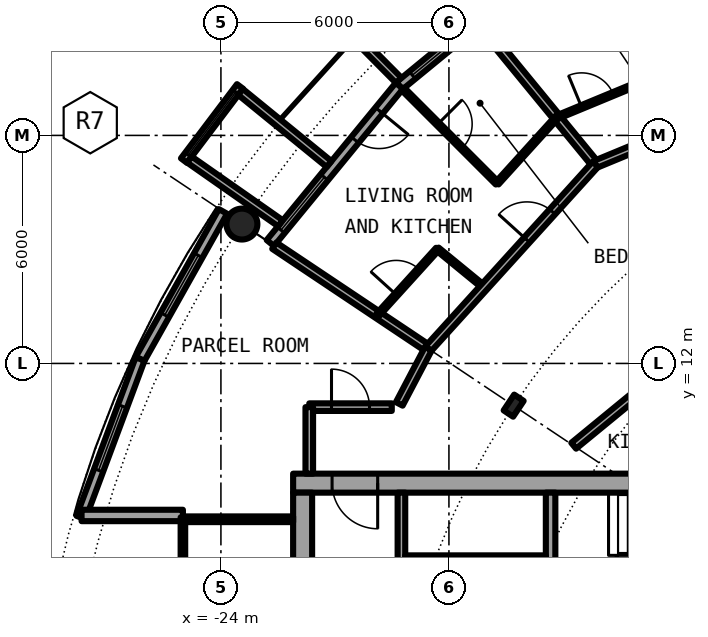
"""IFC4 building model, lengths in metres.
Left out: names, types, materials, properties, quantities, classifications, styles, units other than length and angle.
Written with IfcOpenShell. Run it as: python <this file> out.ifc"""

import sys

from ifc_helpers import new_model, si_unit, direction, frame, frame_2d, origin, origin_2d, place, context, subcontext, project, spatial, rectangle, circle, hollow_circle, i_section, extrude, element, fill, save


model = new_model("IFC4")
c1 = context("Model", 3, precision=1e-05, world=origin(), true_north=direction((0.0, 1.0)))
c2 = subcontext(c1, "Body", "Model", "MODEL_VIEW")
j1 = project(units=[si_unit("LENGTHUNIT", "METRE"), si_unit("PLANEANGLEUNIT", "RADIAN")], contexts=[c1])
p1 = place(None, origin())
s1 = spatial("IfcSite", under=j1, at=p1, CompositionType="ELEMENT")
p2 = place(p1, origin())
s2 = spatial("IfcBuilding", under=s1, at=p2, CompositionType="ELEMENT")
p3 = place(p2, frame((0.0, 0.0, 173.8)))
s3 = spatial("IfcBuildingStorey", under=s2, at=p3, CompositionType="ELEMENT", Elevation=173.8)
p4 = place(p3, frame((-23.448, 15.667, 0.0), z_axis=(0.0, 0.0, 1.0), x_axis=(1.0, 0.0, 0.0)))
e1 = element("IfcColumn", 1, at=p4, inside=s3, PredefinedType="COLUMN", context=c2, shape_type="SweptSolid", body=[
    extrude(hollow_circle(Radius=0.406, WallThickness=0.04, at=origin_2d()), origin(), (0.0, 0.0, 1.0), 3.05),
])
p5 = place(p3, frame((-16.297, 10.889, 0.0), z_axis=(0.0, 0.0, 1.0), x_axis=(-0.831469612303, 0.55557023302, 0.0)))
e2 = element("IfcColumn", 2, at=p5, inside=s3, PredefinedType="COLUMN", context=c2, shape_type="SweptSolid", body=[
    extrude(i_section(OverallWidth=0.3, OverallDepth=0.5, WebThickness=0.014, FlangeThickness=0.028, FilletRadius=0.027, at=origin_2d()), origin(), (0.0, 0.0, 1.0), 3.05),
])
p6 = place(p3, frame((-15.167, 22.699, 0.0), z_axis=(0.0, 0.0, 1.0), x_axis=(-0.773019449054, -0.634382322723, 0.0)))
e3 = element("IfcWall", 3, at=p6, inside=s3, PredefinedType="SOLIDWALL", context=c2, shape_type="SweptSolid", body=[
    extrude(rectangle(XDim=5.352, YDim=0.25, at=frame_2d((2.676, 0.0))), origin(), (0.0, 0.0, 1.0), 2.7),
])
p7 = place(p6, frame((0.841, 0.0, 0.0)))
e4 = element("IfcOpeningElement", 4, at=p7, cuts=e3, PredefinedType="OPENING", context=c2, shape_type="SweptSolid", body=[
    extrude(rectangle(XDim=1.0, YDim=2.2, at=frame_2d((0.5, 1.1))), frame((0.0, 0.135, 0.0), z_axis=(0.0, -1.0, 0.0), x_axis=(1.0, 0.0, 0.0)), (0.0, 0.0, 1.0), 0.27),
])
p8 = place(p6, frame((3.111, 0.0, 0.3)))
e5 = element("IfcOpeningElement", 5, at=p8, cuts=e3, PredefinedType="OPENING", context=c2, shape_type="SweptSolid", body=[
    extrude(rectangle(XDim=1.8, YDim=2.1, at=frame_2d((0.9, 1.05))), frame((0.0, 0.135, 0.0), z_axis=(0.0, -1.0, 0.0), x_axis=(1.0, 0.0, 0.0)), (0.0, 0.0, 1.0), 0.27),
])
p9 = place(p3, frame((-19.323, 19.45, -0.03), z_axis=(0.0, 0.0, 1.0), x_axis=(-0.704476739375, 0.709727076896, 0.0)))
e6 = element("IfcWall", 6, at=p9, inside=s3, PredefinedType="SOLIDWALL", context=c2, shape_type="SweptSolid", body=[
    extrude(rectangle(XDim=2.883, YDim=0.2, at=frame_2d((1.441, 0.0))), origin(), (0.0, 0.0, 1.0), 2.73),
])
p10 = place(p3, frame((-19.304, 19.304, 0.0), z_axis=(0.0, 0.0, 1.0), x_axis=(-0.634382322723, -0.773019449054, 0.0)))
e7 = element("IfcWall", 7, at=p10, inside=s3, PredefinedType="SOLIDWALL", context=c2, shape_type="SweptSolid", body=[
    extrude(rectangle(XDim=5.352, YDim=0.25, at=frame_2d((2.676, 0.0))), origin(), (0.0, 0.0, 1.0), 2.7),
])
p11 = place(p10, frame((0.841, 0.0, 0.0)))
e8 = element("IfcOpeningElement", 8, at=p11, cuts=e7, PredefinedType="OPENING", context=c2, shape_type="SweptSolid", body=[
    extrude(rectangle(XDim=1.0, YDim=2.2, at=frame_2d((0.5, 1.1))), frame((0.0, 0.135, 0.0), z_axis=(0.0, -1.0, 0.0), x_axis=(1.0, 0.0, 0.0)), (0.0, 0.0, 1.0), 0.27),
])
p12 = place(p10, frame((3.111, 0.0, 0.3)))
e9 = element("IfcOpeningElement", 9, at=p12, cuts=e7, PredefinedType="OPENING", context=c2, shape_type="SweptSolid", body=[
    extrude(rectangle(XDim=1.8, YDim=2.1, at=frame_2d((0.9, 1.05))), frame((0.0, 0.135, 0.0), z_axis=(0.0, -1.0, 0.0), x_axis=(1.0, 0.0, 0.0)), (0.0, 0.0, 1.0), 0.27),
])
p13 = place(p3, frame((-23.497, 19.289, -0.03), z_axis=(0.0, 0.0, 1.0), x_axis=(-0.602806268067, -0.797887588059, 0.0)))
e10 = element("IfcWall", 10, at=p13, inside=s3, PredefinedType="SOLIDWALL", context=c2, shape_type="SweptSolid", body=[
    extrude(rectangle(XDim=2.447, YDim=0.2, at=frame_2d((1.223, 0.0))), origin(), (0.0, 0.0, 1.0), 2.73),
])
p14 = place(p13, frame((0.183, 0.0, 0.33)))
e11 = element("IfcOpeningElement", 11, at=p14, cuts=e10, PredefinedType="OPENING", context=c2, shape_type="SweptSolid", body=[
    extrude(circle(Radius=1.04, at=frame_2d((1.04, 1.04))), frame((0.0, 0.11, 0.0), z_axis=(0.0, -1.0, 0.0), x_axis=(1.0, 0.0, 0.0)), (0.0, 0.0, 1.0), 0.22),
])
p15 = place(p3, frame((-21.155, 17.246, -0.03), z_axis=(0.0, 0.0, 1.0), x_axis=(-0.775179004516, 0.631741648902, 0.0)))
e12 = element("IfcWall", 12, at=p15, inside=s3, PredefinedType="SOLIDWALL", context=c2, shape_type="SweptSolid", body=[
    extrude(rectangle(XDim=3.006, YDim=0.2, at=frame_2d((1.503, 0.0))), origin(), (0.0, 0.0, 1.0), 2.73),
])
p16 = place(p3, frame((-22.433, 15.688, -0.03), z_axis=(0.0, 0.0, 1.0), x_axis=(-0.819373043115, 0.573260687834, 0.0)))
e13 = element("IfcWall", 13, at=p16, inside=s3, PredefinedType="SOLIDWALL", context=c2, shape_type="SweptSolid", body=[
    extrude(rectangle(XDim=2.925, YDim=0.2, at=frame_2d((1.463, 0.0))), origin(), (0.0, 0.0, 1.0), 2.73),
])
p17 = place(p3, frame((-23.946, 16.0, 0.0), z_axis=(0.0, 0.0, 1.0), x_axis=(-0.489696356642, -0.871893042919, 0.0)))
e14 = element("IfcWall", 14, at=p17, inside=s3, PredefinedType="SOLIDWALL", context=c2, shape_type="SweptSolid", body=[
    extrude(rectangle(XDim=4.454, YDim=0.25, at=frame_2d((2.227, 0.0))), origin(), (0.0, 0.0, 1.0), 2.7),
])
p18 = place(p17, frame((1.327, 0.0, 0.3)))
e15 = element("IfcOpeningElement", 15, at=p18, cuts=e14, PredefinedType="OPENING", context=c2, shape_type="SweptSolid", body=[
    extrude(rectangle(XDim=1.8, YDim=2.1, at=frame_2d((0.9, 1.05))), frame((0.0, 0.135, 0.0), z_axis=(0.0, -1.0, 0.0), x_axis=(1.0, 0.0, 0.0)), (0.0, 0.0, 1.0), 0.27),
])
p19 = place(p3, frame((-26.127, 12.117, 0.0), z_axis=(0.0, 0.0, 1.0), x_axis=(-0.349247811493, -0.937030397675, 0.0)))
e16 = element("IfcWall", 16, at=p19, inside=s3, PredefinedType="SOLIDWALL", context=c2, shape_type="SweptSolid", body=[
    extrude(rectangle(XDim=4.452, YDim=0.25, at=frame_2d((2.226, 0.0))), origin(), (0.0, 0.0, 1.0), 2.7),
])
p20 = place(p19, frame((1.327, 0.0, 0.3)))
e17 = element("IfcOpeningElement", 17, at=p20, cuts=e16, PredefinedType="OPENING", context=c2, shape_type="SweptSolid", body=[
    extrude(rectangle(XDim=1.8, YDim=2.1, at=frame_2d((0.9, 1.05))), frame((0.0, 0.135, 0.0), z_axis=(0.0, -1.0, 0.0), x_axis=(1.0, 0.0, 0.0)), (0.0, 0.0, 1.0), 0.27),
])
p21 = place(p3, frame((-25.0, 8.0, 0.0), z_axis=(0.0, 0.0, 1.0), x_axis=(-1.0, 0.0, 0.0)))
e18 = element("IfcWall", 18, at=p21, inside=s3, PredefinedType="SOLIDWALL", context=c2, shape_type="SweptSolid", body=[
    extrude(rectangle(XDim=2.667, YDim=0.3, at=frame_2d((1.333, 0.0))), origin(), (0.0, 0.0, 1.0), 2.7),
])
p22 = place(p3, frame((-8.5, 8.85, 0.0), z_axis=(0.0, 0.0, 1.0), x_axis=(-1.0, 0.0, 0.0)))
e19 = element("IfcWall", 19, at=p22, inside=s3, PredefinedType="SHEAR", context=c2, shape_type="SweptSolid", body=[
    extrude(rectangle(XDim=13.6, YDim=0.5, at=frame_2d((6.8, 0.0))), origin(), (0.0, 0.0, 1.0), 3.05),
])
p23 = place(p22, frame((11.375, 0.0, 0.0)))
e20 = element("IfcOpeningElement", 20, at=p23, cuts=e19, PredefinedType="OPENING", context=c2, shape_type="SweptSolid", body=[
    extrude(rectangle(XDim=1.2, YDim=2.3, at=frame_2d((0.6, 1.15))), frame((0.0, 0.26, 0.0), z_axis=(0.0, -1.0, 0.0), x_axis=(1.0, 0.0, 0.0)), (0.0, 0.0, 1.0), 0.52),
])
p24 = place(p3, frame((-21.85, -8.6, 0.0), z_axis=(0.0, 0.0, 1.0), x_axis=(0.0, 1.0, 0.0)))
e21 = element("IfcWall", 21, at=p24, inside=s3, PredefinedType="SHEAR", context=c2, shape_type="SweptSolid", body=[
    extrude(rectangle(XDim=17.2, YDim=0.5, at=frame_2d((8.6, 0.0))), origin(), (0.0, 0.0, 1.0), 3.05),
])
p25 = place(p24, frame((7.7, 0.0, 0.0)))
e22 = element("IfcOpeningElement", 22, at=p25, cuts=e21, PredefinedType="OPENING", context=c2, shape_type="SweptSolid", body=[
    extrude(rectangle(XDim=1.8, YDim=2.3, at=frame_2d((0.9, 1.15))), frame((0.0, 0.26, 0.0), z_axis=(0.0, -1.0, 0.0), x_axis=(1.0, 0.0, 0.0)), (0.0, 0.0, 1.0), 0.52),
])
p26 = place(p3, frame((-15.325, 8.6, 0.0), z_axis=(0.0, 0.0, 1.0), x_axis=(0.0, -1.0, 0.0)))
e23 = element("IfcWall", 23, at=p26, inside=s3, PredefinedType="SHEAR", context=c2, shape_type="SweptSolid", body=[
    extrude(rectangle(XDim=3.95, YDim=0.25, at=frame_2d((1.975, 0.0))), origin(), (0.0, 0.0, 1.0), 3.05),
])
p27 = place(p26, frame((2.025, 0.0, 0.0)))
e24 = element("IfcOpeningElement", 24, at=p27, cuts=e23, PredefinedType="OPENING", context=c2, shape_type="SweptSolid", body=[
    extrude(rectangle(XDim=1.2, YDim=2.3, at=frame_2d((0.6, 1.15))), frame((0.0, 0.135, 0.0), z_axis=(0.0, -1.0, 0.0), x_axis=(1.0, 0.0, 0.0)), (0.0, 0.0, 1.0), 0.27),
])
p28 = place(p3, frame((-19.25, 8.6, 0.0), z_axis=(0.0, 0.0, 1.0), x_axis=(0.0, -1.0, 0.0)))
e25 = element("IfcWall", 25, at=p28, inside=s3, PredefinedType="SOLIDWALL", context=c2, shape_type="SweptSolid", body=[
    extrude(rectangle(XDim=7.025, YDim=0.2, at=frame_2d((3.513, 0.0))), origin(), (0.0, 0.0, 1.0), 2.7),
])
p29 = place(p28, frame((2.35, 0.0, 0.0)))
e26 = element("IfcOpeningElement", 26, at=p29, cuts=e25, PredefinedType="OPENING", context=c2, shape_type="SweptSolid", body=[
    extrude(rectangle(XDim=1.1, YDim=2.3, at=frame_2d((0.55, 1.15))), frame((0.0, 0.11, 0.0), z_axis=(0.0, -1.0, 0.0), x_axis=(1.0, 0.0, 0.0)), (0.0, 0.0, 1.0), 0.22),
])
p30 = place(p3, frame((-15.45, 6.875, 0.0), z_axis=(0.0, 0.0, 1.0), x_axis=(-1.0, 0.0, 0.0)))
e27 = element("IfcWall", 27, at=p30, inside=s3, PredefinedType="PARTITIONING", context=c2, shape_type="SweptSolid", body=[
    extrude(rectangle(XDim=3.7, YDim=0.15, at=frame_2d((1.85, 0.0))), origin(), (0.0, 0.0, 1.0), 2.7),
])
p31 = place(p30, frame((1.4, 0.0, 0.0)))
e28 = element("IfcOpeningElement", 28, at=p31, cuts=e27, PredefinedType="OPENING", context=c2, shape_type="SweptSolid", body=[
    extrude(rectangle(XDim=0.9, YDim=2.3, at=frame_2d((0.45, 1.15))), frame((0.0, 0.085, 0.0), z_axis=(0.0, -1.0, 0.0), x_axis=(1.0, 0.0, 0.0)), (0.0, 0.0, 1.0), 0.17),
])
p32 = place(p3, frame((-22.1, 7.9, 0.0), z_axis=(0.0, 0.0, 1.0), x_axis=(-1.0, 0.0, 0.0)))
e29 = element("IfcWall", 29, at=p32, inside=s3, PredefinedType="PARTITIONING", context=c2, shape_type="SweptSolid", body=[
    extrude(rectangle(XDim=2.84, YDim=0.15, at=frame_2d((1.42, 0.0))), origin(), (0.0, 0.0, 1.0), 2.7),
])
p33 = place(p3, frame((-25.0, 7.95, 0.0), z_axis=(0.0, 0.0, 1.0), x_axis=(0.0, -1.0, 0.0)))
e30 = element("IfcWall", 30, at=p33, inside=s3, PredefinedType="PARTITIONING", context=c2, shape_type="SweptSolid", body=[
    extrude(rectangle(XDim=15.9, YDim=0.12, at=frame_2d((7.95, 0.0))), origin(), (0.0, 0.0, 1.0), 2.7),
])
p34 = place(p33, frame((0.95, 0.0, 0.1)))
e31 = element("IfcOpeningElement", 31, at=p34, cuts=e30, PredefinedType="OPENING", context=c2, shape_type="SweptSolid", body=[
    extrude(rectangle(XDim=14.0, YDim=2.35, at=frame_2d((7.0, 1.175))), frame((0.0, 0.07, 0.0), z_axis=(0.0, -1.0, 0.0), x_axis=(1.0, 0.0, 0.0)), (0.0, 0.0, 1.0), 0.14),
])
p35 = place(p3, frame((-22.595, 15.098, 0.0), z_axis=(0.0, 0.0, 1.0), x_axis=(0.831387096605, -0.55569370664, 0.0)))
e32 = element("IfcWall", 32, at=p35, inside=s3, PredefinedType="PARTITIONING", context=c2, shape_type="SweptSolid", body=[
    extrude(rectangle(XDim=4.875, YDim=0.2, at=frame_2d((2.438, 0.0))), origin(), (0.0, 0.0, 1.0), 2.7),
])
p36 = place(p3, frame((-19.21, 19.222, 0.0), z_axis=(0.0, 0.0, 1.0), x_axis=(0.706967463531, -0.707246071398, 0.0)))
e33 = element("IfcWall", 33, at=p36, inside=s3, PredefinedType="PARTITIONING", context=c2, shape_type="SweptSolid", body=[
    extrude(rectangle(XDim=3.505, YDim=0.1, at=frame_2d((1.752, 0.0))), origin(), (0.0, 0.0, 1.0), 2.7),
])
p37 = place(p36, frame((1.303, 0.0, 0.0)))
e34 = element("IfcOpeningElement", 34, at=p37, cuts=e33, PredefinedType="OPENING", context=c2, shape_type="SweptSolid", body=[
    extrude(rectangle(XDim=0.9, YDim=2.3, at=frame_2d((0.45, 1.15))), frame((0.0, 0.06, 0.0), z_axis=(0.0, -1.0, 0.0), x_axis=(1.0, 0.0, 0.0)), (0.0, 0.0, 1.0), 0.12),
])
p38 = place(p3, frame((-17.24, 21.007, 0.0), z_axis=(0.0, 0.0, 1.0), x_axis=(0.634374159378, -0.773026148273, 0.0)))
e35 = element("IfcWall", 35, at=p38, inside=s3, PredefinedType="PARTITIONING", context=c2, shape_type="SweptSolid", body=[
    extrude(rectangle(XDim=4.876, YDim=0.2, at=frame_2d((2.438, 0.0))), origin(), (0.0, 0.0, 1.0), 2.7),
])
p39 = place(p3, frame((-18.302, 15.01, 0.0), z_axis=(0.0, 0.0, 1.0), x_axis=(0.773476341377, -0.633825172528, 0.0)))
e36 = element("IfcWall", 36, at=p39, inside=s3, PredefinedType="PARTITIONING", context=c2, shape_type="SweptSolid", body=[
    extrude(rectangle(XDim=1.584, YDim=0.1, at=frame_2d((0.792, 0.0))), origin(), (0.0, 0.0, 1.0), 2.7),
])
p40 = place(p3, frame((-21.675, 10.85, 0.0), z_axis=(0.0, 0.0, 1.0), x_axis=(1.0, 0.0, 0.0)))
e37 = element("IfcWall", 37, at=p40, inside=s3, PredefinedType="PARTITIONING", context=c2, shape_type="SweptSolid", body=[
    extrude(rectangle(XDim=2.171, YDim=0.2, at=frame_2d((1.085, 0.0))), origin(), (0.0, 0.0, 1.0), 2.7),
])
p41 = place(p40, frame((0.585, 0.0, 0.0)))
e38 = element("IfcOpeningElement", 38, at=p41, cuts=e37, PredefinedType="OPENING", context=c2, shape_type="SweptSolid", body=[
    extrude(rectangle(XDim=1.0, YDim=2.3, at=frame_2d((0.5, 1.15))), frame((0.0, 0.11, 0.0), z_axis=(0.0, -1.0, 0.0), x_axis=(1.0, 0.0, 0.0)), (0.0, 0.0, 1.0), 0.22),
])
p42 = place(p3, frame((-14.717, 9.834, 0.0), z_axis=(0.0, 0.0, 1.0), x_axis=(0.773034536097, 0.634363938131, 0.0)))
e39 = element("IfcWall", 39, at=p42, inside=s3, PredefinedType="PARTITIONING", context=c2, shape_type="SweptSolid", body=[
    extrude(rectangle(XDim=10.277, YDim=0.2, at=frame_2d((5.138, 0.0))), origin(), (0.0, 0.0, 1.0), 2.7),
])
p43 = place(p42, frame((4.638, 0.0, 0.0)))
e40 = element("IfcOpeningElement", 40, at=p43, cuts=e39, PredefinedType="OPENING", context=c2, shape_type="SweptSolid", body=[
    extrude(rectangle(XDim=1.0, YDim=2.3, at=frame_2d((0.5, 1.15))), frame((0.0, 0.11, 0.0), z_axis=(0.0, -1.0, 0.0), x_axis=(1.0, 0.0, 0.0)), (0.0, 0.0, 1.0), 0.22),
])
p44 = place(p3, frame((-14.147, 17.238, 0.0), z_axis=(0.0, 0.0, 1.0), x_axis=(0.923860535822, 0.382729291212, 0.0)))
e41 = element("IfcWall", 41, at=p44, inside=s3, PredefinedType="PARTITIONING", context=c2, shape_type="SweptSolid", body=[
    extrude(rectangle(XDim=12.947, YDim=0.2, at=frame_2d((6.473, 0.0))), origin(), (0.0, 0.0, 1.0), 2.7),
])
p45 = place(p44, frame((7.053, 0.0, 0.0)))
e42 = element("IfcOpeningElement", 42, at=p45, cuts=e41, PredefinedType="OPENING", context=c2, shape_type="SweptSolid", body=[
    extrude(rectangle(XDim=1.0, YDim=2.3, at=frame_2d((0.5, 1.15))), frame((0.0, 0.11, 0.0), z_axis=(0.0, -1.0, 0.0), x_axis=(1.0, 0.0, 0.0)), (0.0, 0.0, 1.0), 0.22),
])
p46 = place(p3, frame((-21.675, 9.1, 0.0), z_axis=(0.0, 0.0, 1.0), x_axis=(0.0, 1.0, 0.0)))
e43 = element("IfcWall", 43, at=p46, inside=s3, PredefinedType="PARTITIONING", context=c2, shape_type="SweptSolid", body=[
    extrude(rectangle(XDim=1.75, YDim=0.2, at=frame_2d((0.875, 0.0))), origin(), (0.0, 0.0, 1.0), 2.7),
])
p47 = place(p3, frame((-18.542, 12.389, 0.0), z_axis=(0.0, 0.0, 1.0), x_axis=(0.671561669125, 0.740948665268, 0.0)))
e44 = element("IfcWall", 44, at=p47, inside=s3, PredefinedType="PARTITIONING", context=c2, shape_type="SweptSolid", body=[
    extrude(rectangle(XDim=6.544, YDim=0.2, at=frame_2d((3.272, 0.0))), origin(), (0.0, 0.0, 1.0), 2.7),
])
p48 = place(p47, frame((3.862, 0.0, 0.0)))
e45 = element("IfcOpeningElement", 45, at=p48, cuts=e44, PredefinedType="OPENING", context=c2, shape_type="SweptSolid", body=[
    extrude(rectangle(XDim=1.0, YDim=2.3, at=frame_2d((0.5, 1.15))), frame((0.0, 0.11, 0.0), z_axis=(0.0, -1.0, 0.0), x_axis=(1.0, 0.0, 0.0)), (0.0, 0.0, 1.0), 0.22),
])
p49 = place(p3, frame((-19.307, 10.935, 0.0), z_axis=(0.0, 0.0, 1.0), x_axis=(0.465605550524, 0.884992356646, 0.0)))
e46 = element("IfcWall", 46, at=p49, inside=s3, PredefinedType="PARTITIONING", context=c2, shape_type="SweptSolid", body=[
    extrude(rectangle(XDim=1.643, YDim=0.2, at=frame_2d((0.821, 0.0))), origin(), (0.0, 0.0, 1.0), 2.7),
])
p50 = place(p3, frame((-15.162, 18.475, 0.0), z_axis=(0.0, 0.0, 1.0), x_axis=(0.923917795213, 0.382591044968, 0.0)))
e47 = element("IfcWall", 47, at=p50, inside=s3, PredefinedType="PARTITIONING", context=c2, shape_type="SweptSolid", body=[
    extrude(rectangle(XDim=2.313, YDim=0.1, at=frame_2d((1.157, 0.0))), origin(), (0.0, 0.0, 1.0), 2.7),
])
p51 = place(p50, frame((0.707, 0.0, 0.0)))
e48 = element("IfcOpeningElement", 48, at=p51, cuts=e47, PredefinedType="OPENING", context=c2, shape_type="SweptSolid", body=[
    extrude(rectangle(XDim=0.9, YDim=2.3, at=frame_2d((0.45, 1.15))), frame((0.0, 0.06, 0.0), z_axis=(0.0, -1.0, 0.0), x_axis=(1.0, 0.0, 0.0)), (0.0, 0.0, 1.0), 0.12),
])
p52 = place(p3, frame((-19.872, 13.278, 0.0), z_axis=(0.0, 0.0, 1.0), x_axis=(0.671637685376, 0.740879760544, 0.0)))
e49 = element("IfcWall", 49, at=p52, inside=s3, PredefinedType="PARTITIONING", context=c2, shape_type="SweptSolid", body=[
    extrude(rectangle(XDim=2.338, YDim=0.1, at=frame_2d((1.169, 0.0))), origin(), (0.0, 0.0, 1.0), 2.7),
])
p53 = place(p52, frame((0.719, 0.0, 0.0)))
e50 = element("IfcOpeningElement", 50, at=p53, cuts=e49, PredefinedType="OPENING", context=c2, shape_type="SweptSolid", body=[
    extrude(rectangle(XDim=0.9, YDim=2.3, at=frame_2d((0.45, 1.15))), frame((0.0, 0.06, 0.0), z_axis=(0.0, -1.0, 0.0), x_axis=(1.0, 0.0, 0.0)), (0.0, 0.0, 1.0), 0.12),
])
p54 = place(p3, frame((-16.732, 16.743, 0.0), z_axis=(0.0, 0.0, 1.0), x_axis=(0.671528384412, 0.740978831634, 0.0)))
e51 = element("IfcWall", 51, at=p54, inside=s3, PredefinedType="PARTITIONING", context=c2, shape_type="SweptSolid", body=[
    extrude(rectangle(XDim=2.338, YDim=0.1, at=frame_2d((1.169, 0.0))), origin(), (0.0, 0.0, 1.0), 2.7),
])
p55 = place(p8, origin())
e52 = element("IfcWindow", 52, at=p55, inside=s3, PartitioningType="SINGLE_PANEL", PredefinedType="WINDOW", context=c2, shape_type="SweptSolid", body=[
    extrude(rectangle(XDim=1.8, YDim=2.1, at=frame_2d((0.9, 1.05))), frame((0.0, 0.03, 0.0), z_axis=(0.0, -1.0, 0.0), x_axis=(1.0, 0.0, 0.0)), (0.0, 0.0, 1.0), 0.06),
])
fill(e5, e52)
p56 = place(p11, origin())
e53 = element("IfcDoor", 53, at=p56, inside=s3, OperationType="SINGLE_SWING_LEFT", PredefinedType="DOOR", context=c2, shape_type="SweptSolid", body=[
    extrude(rectangle(XDim=1.0, YDim=2.2, at=frame_2d((0.5, 1.1))), frame((0.0, 0.025, 0.0), z_axis=(0.0, -1.0, 0.0), x_axis=(1.0, 0.0, 0.0)), (0.0, 0.0, 1.0), 0.05),
])
fill(e8, e53)
p57 = place(p12, origin())
e54 = element("IfcWindow", 54, at=p57, inside=s3, PartitioningType="SINGLE_PANEL", PredefinedType="WINDOW", context=c2, shape_type="SweptSolid", body=[
    extrude(rectangle(XDim=1.8, YDim=2.1, at=frame_2d((0.9, 1.05))), frame((0.0, 0.03, 0.0), z_axis=(0.0, -1.0, 0.0), x_axis=(1.0, 0.0, 0.0)), (0.0, 0.0, 1.0), 0.06),
])
fill(e9, e54)
p58 = place(p14, origin())
e55 = element("IfcWindow", 55, at=p58, inside=s3, PartitioningType="SINGLE_PANEL", PredefinedType="WINDOW", context=c2, shape_type="SweptSolid", body=[
    extrude(circle(Radius=1.04, at=frame_2d((1.04, 1.04))), frame((0.0, 0.03, 0.0), z_axis=(0.0, -1.0, 0.0), x_axis=(1.0, 0.0, 0.0)), (0.0, 0.0, 1.0), 0.06),
])
fill(e11, e55)
p59 = place(p18, origin())
e56 = element("IfcWindow", 56, at=p59, inside=s3, PartitioningType="SINGLE_PANEL", PredefinedType="WINDOW", context=c2, shape_type="SweptSolid", body=[
    extrude(rectangle(XDim=1.8, YDim=2.1, at=frame_2d((0.9, 1.05))), frame((0.0, 0.03, 0.0), z_axis=(0.0, -1.0, 0.0), x_axis=(1.0, 0.0, 0.0)), (0.0, 0.0, 1.0), 0.06),
])
fill(e15, e56)
p60 = place(p20, origin())
e57 = element("IfcWindow", 57, at=p60, inside=s3, PartitioningType="SINGLE_PANEL", PredefinedType="WINDOW", context=c2, shape_type="SweptSolid", body=[
    extrude(rectangle(XDim=1.8, YDim=2.1, at=frame_2d((0.9, 1.05))), frame((0.0, 0.03, 0.0), z_axis=(0.0, -1.0, 0.0), x_axis=(1.0, 0.0, 0.0)), (0.0, 0.0, 1.0), 0.06),
])
fill(e17, e57)
p61 = place(p31, origin())
e58 = element("IfcDoor", 58, at=p61, inside=s3, OperationType="SINGLE_SWING_LEFT", PredefinedType="DOOR", context=c2, shape_type="SweptSolid", body=[
    extrude(rectangle(XDim=0.9, YDim=2.3, at=frame_2d((0.45, 1.15))), frame((0.0, 0.025, 0.0), z_axis=(0.0, -1.0, 0.0), x_axis=(1.0, 0.0, 0.0)), (0.0, 0.0, 1.0), 0.05),
])
fill(e28, e58)
p62 = place(p23, origin())
e59 = element("IfcDoor", 59, at=p62, inside=s3, OperationType="SINGLE_SWING_LEFT", PredefinedType="DOOR", context=c2, shape_type="SweptSolid", body=[
    extrude(rectangle(XDim=1.2, YDim=2.3, at=frame_2d((0.6, 1.15))), frame((0.0, 0.025, 0.0), z_axis=(0.0, -1.0, 0.0), x_axis=(1.0, 0.0, 0.0)), (0.0, 0.0, 1.0), 0.05),
])
fill(e20, e59)
p63 = place(p34, origin())
e60 = element("IfcWindow", 60, at=p63, inside=s3, PartitioningType="SINGLE_PANEL", PredefinedType="WINDOW", context=c2, shape_type="SweptSolid", body=[
    extrude(rectangle(XDim=14.0, YDim=2.35, at=frame_2d((7.0, 1.175))), frame((0.0, 0.03, 0.0), z_axis=(0.0, -1.0, 0.0), x_axis=(1.0, 0.0, 0.0)), (0.0, 0.0, 1.0), 0.06),
])
fill(e31, e60)
p64 = place(p51, origin())
e61 = element("IfcDoor", 61, at=p64, inside=s3, OperationType="SINGLE_SWING_LEFT", PredefinedType="DOOR", context=c2, shape_type="SweptSolid", body=[
    extrude(rectangle(XDim=0.9, YDim=2.3, at=frame_2d((0.45, 1.15))), frame((0.0, 0.025, 0.0), z_axis=(0.0, -1.0, 0.0), x_axis=(1.0, 0.0, 0.0)), (0.0, 0.0, 1.0), 0.05),
])
fill(e48, e61)
p65 = place(p48, origin())
e62 = element("IfcDoor", 62, at=p65, inside=s3, OperationType="SINGLE_SWING_RIGHT", PredefinedType="DOOR", context=c2, shape_type="SweptSolid", body=[
    extrude(rectangle(XDim=1.0, YDim=2.3, at=frame_2d((0.5, 1.15))), frame((0.0, 0.025, 0.0), z_axis=(0.0, -1.0, 0.0), x_axis=(1.0, 0.0, 0.0)), (0.0, 0.0, 1.0), 0.05),
])
fill(e45, e62)
p66 = place(p53, origin())
e63 = element("IfcDoor", 63, at=p66, inside=s3, OperationType="SINGLE_SWING_LEFT", PredefinedType="DOOR", context=c2, shape_type="SweptSolid", body=[
    extrude(rectangle(XDim=0.9, YDim=2.3, at=frame_2d((0.45, 1.15))), frame((0.0, 0.025, 0.0), z_axis=(0.0, -1.0, 0.0), x_axis=(1.0, 0.0, 0.0)), (0.0, 0.0, 1.0), 0.05),
])
fill(e50, e63)
p67 = place(p37, origin())
e64 = element("IfcDoor", 64, at=p67, inside=s3, OperationType="SINGLE_SWING_LEFT", PredefinedType="DOOR", context=c2, shape_type="SweptSolid", body=[
    extrude(rectangle(XDim=0.9, YDim=2.3, at=frame_2d((0.45, 1.15))), frame((0.0, 0.025, 0.0), z_axis=(0.0, -1.0, 0.0), x_axis=(1.0, 0.0, 0.0)), (0.0, 0.0, 1.0), 0.05),
])
fill(e34, e64)
p68 = place(p41, origin())
e65 = element("IfcDoor", 65, at=p68, inside=s3, OperationType="SINGLE_SWING_LEFT", PredefinedType="DOOR", context=c2, shape_type="SweptSolid", body=[
    extrude(rectangle(XDim=1.0, YDim=2.3, at=frame_2d((0.5, 1.15))), frame((0.0, 0.025, 0.0), z_axis=(0.0, -1.0, 0.0), x_axis=(1.0, 0.0, 0.0)), (0.0, 0.0, 1.0), 0.05),
])
fill(e38, e65)
save(model, sys.argv[1])
